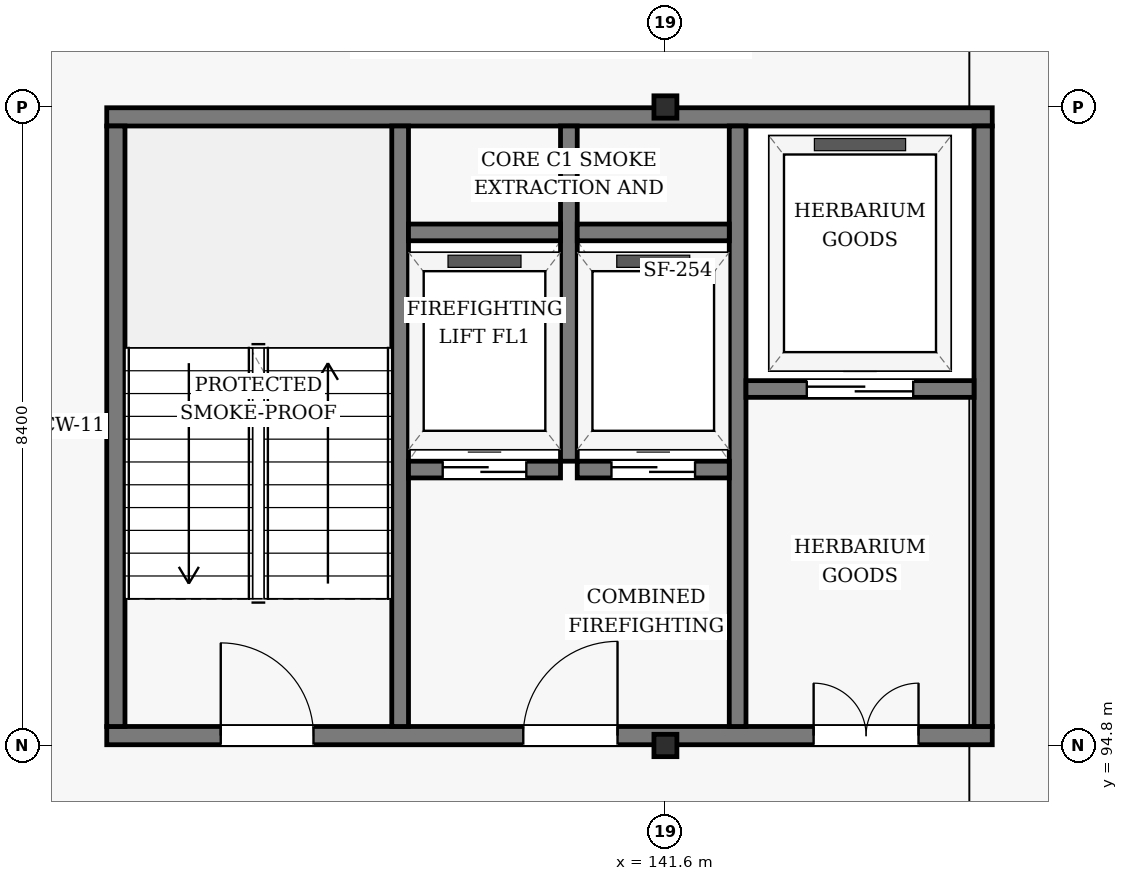
"""IFC4 building model, lengths in metres.
Left out: names, types, materials, properties, quantities, classifications, styles, units other than length and angle.
Written with IfcOpenShell. Run it as: python <this file> out.ifc"""

import sys

from ifc_helpers import new_model, si_unit, direction, frame, frame_2d, origin, origin_2d, place, context, subcontext, project, spatial, rectangle, i_section, extrude, element, fill, save


model = new_model("IFC4")
c1 = context("Model", 3, precision=1e-05, world=origin(), true_north=direction((0.0, 1.0)))
c2 = subcontext(c1, "Body", "Model", "MODEL_VIEW")
j1 = project(units=[si_unit("LENGTHUNIT", "METRE"), si_unit("PLANEANGLEUNIT", "RADIAN")], contexts=[c1])
p1 = place(None, origin())
s1 = spatial("IfcSite", under=j1, at=p1, CompositionType="ELEMENT")
p2 = place(p1, origin())
s2 = spatial("IfcBuilding", under=s1, at=p2, CompositionType="ELEMENT")
p3 = place(p2, frame((0.0, 0.0, 54.0)))
s3 = spatial("IfcBuildingStorey", under=s2, at=p3, CompositionType="ELEMENT", Elevation=54.0)
for number, where, z_axis, x_axis in (
    (1, (141.6, 94.8, 0.0), (0.0, 0.0, 1.0), (1.0, 0.0, 0.0)),
    (2, (141.6, 103.2, 0.0), (0.0, 0.0, 1.0), (1.0, 0.0, 0.0)),
):
    element("IfcColumn", number, at=place(p3, frame(where, z_axis=z_axis, x_axis=x_axis)), inside=s3, PredefinedType="COLUMN", context=c2, shape_type="SweptSolid", body=[
        extrude(i_section(OverallWidth=0.302, OverallDepth=0.294, WebThickness=0.012, FlangeThickness=0.012, FilletRadius=0.018, at=origin_2d()), origin(), (0.0, 0.0, 1.0), 3.6),
    ])
p4 = place(p3, frame((134.25, 94.93, 0.0), z_axis=(0.0, 0.0, 1.0), x_axis=(1.0, 0.0, 0.0)))
e3 = element("IfcWall", 3, at=p4, inside=s3, PredefinedType="SHEAR", context=c2, shape_type="SweptSolid", body=[
    extrude(rectangle(XDim=11.65, YDim=0.24, at=frame_2d((5.825, 0.0))), origin(), (0.0, 0.0, 1.0), 3.344),
])
p5 = place(p4, frame((1.5, 0.0, 0.0)))
e4 = element("IfcOpeningElement", 4, at=p5, cuts=e3, PredefinedType="OPENING", context=c2, shape_type="SweptSolid", body=[
    extrude(rectangle(XDim=1.22, YDim=2.18, at=frame_2d((0.61, 1.09))), frame((0.0, 0.13, 0.0), z_axis=(0.0, -1.0, 0.0), x_axis=(1.0, 0.0, 0.0)), (0.0, 0.0, 1.0), 0.26),
])
p6 = place(p4, frame((5.48, 0.0, 0.0)))
e5 = element("IfcOpeningElement", 5, at=p6, cuts=e3, PredefinedType="OPENING", context=c2, shape_type="SweptSolid", body=[
    extrude(rectangle(XDim=1.24, YDim=2.15, at=frame_2d((0.62, 1.075))), frame((0.0, 0.13, 0.0), z_axis=(0.0, -1.0, 0.0), x_axis=(1.0, 0.0, 0.0)), (0.0, 0.0, 1.0), 0.26),
])
p7 = place(p4, frame((9.3, 0.0, 0.0)))
e6 = element("IfcOpeningElement", 6, at=p7, cuts=e3, PredefinedType="OPENING", context=c2, shape_type="SweptSolid", body=[
    extrude(rectangle(XDim=1.38, YDim=2.15, at=frame_2d((0.69, 1.075))), frame((0.0, 0.13, 0.0), z_axis=(0.0, -1.0, 0.0), x_axis=(1.0, 0.0, 0.0)), (0.0, 0.0, 1.0), 0.26),
])
p8 = place(p3, frame((134.25, 103.07, 0.0), z_axis=(0.0, 0.0, 1.0), x_axis=(1.0, 0.0, 0.0)))
e7 = element("IfcWall", 7, at=p8, inside=s3, PredefinedType="SHEAR", context=c2, shape_type="SweptSolid", body=[
    extrude(rectangle(XDim=11.65, YDim=0.24, at=frame_2d((5.825, 0.0))), origin(), (0.0, 0.0, 1.0), 3.344),
])
p9 = place(p3, frame((134.37, 95.05, 0.0), z_axis=(0.0, 0.0, 1.0), x_axis=(0.0, 1.0, 0.0)))
e8 = element("IfcWall", 8, at=p9, inside=s3, PredefinedType="SHEAR", context=c2, shape_type="SweptSolid", body=[
    extrude(rectangle(XDim=7.9, YDim=0.24, at=frame_2d((3.95, 0.0))), origin(), (0.0, 0.0, 1.0), 3.344),
])
p10 = place(p3, frame((138.11, 95.05, 0.0), z_axis=(0.0, 0.0, 1.0), x_axis=(0.0, 1.0, 0.0)))
e9 = element("IfcWall", 9, at=p10, inside=s3, PredefinedType="SHEAR", context=c2, shape_type="SweptSolid", body=[
    extrude(rectangle(XDim=7.9, YDim=0.22, at=frame_2d((3.95, 0.0))), origin(), (0.0, 0.0, 1.0), 3.344),
])
p11 = place(p3, frame((140.33, 98.54, 0.0), z_axis=(0.0, 0.0, 1.0), x_axis=(0.0, 1.0, 0.0)))
e10 = element("IfcWall", 10, at=p11, inside=s3, PredefinedType="SHEAR", context=c2, shape_type="SweptSolid", body=[
    extrude(rectangle(XDim=4.41, YDim=0.22, at=frame_2d((2.205, 0.0))), origin(), (0.0, 0.0, 1.0), 3.344),
])
p12 = place(p3, frame((142.55, 95.05, 0.0), z_axis=(0.0, 0.0, 1.0), x_axis=(0.0, 1.0, 0.0)))
e11 = element("IfcWall", 11, at=p12, inside=s3, PredefinedType="SHEAR", context=c2, shape_type="SweptSolid", body=[
    extrude(rectangle(XDim=7.9, YDim=0.22, at=frame_2d((3.95, 0.0))), origin(), (0.0, 0.0, 1.0), 3.344),
])
p13 = place(p3, frame((145.78, 95.05, 0.0), z_axis=(0.0, 0.0, 1.0), x_axis=(0.0, 1.0, 0.0)))
e12 = element("IfcWall", 12, at=p13, inside=s3, PredefinedType="SHEAR", context=c2, shape_type="SweptSolid", body=[
    extrude(rectangle(XDim=7.9, YDim=0.24, at=frame_2d((3.95, 0.0))), origin(), (0.0, 0.0, 1.0), 3.344),
])
p14 = place(p3, frame((138.22, 98.43, 0.0), z_axis=(0.0, 0.0, 1.0), x_axis=(1.0, 0.0, 0.0)))
e13 = element("IfcWall", 13, at=p14, inside=s3, PredefinedType="SHEAR", context=c2, shape_type="SweptSolid", body=[
    extrude(rectangle(XDim=2.0, YDim=0.22, at=frame_2d((1.0, 0.0))), origin(), (0.0, 0.0, 1.0), 3.344),
])
p15 = place(p14, frame((0.45, 0.0, 0.0)))
e14 = element("IfcOpeningElement", 14, at=p15, cuts=e13, PredefinedType="OPENING", context=c2, shape_type="SweptSolid", body=[
    extrude(rectangle(XDim=1.1, YDim=2.15, at=frame_2d((0.55, 1.075))), frame((0.0, 0.12, 0.0), z_axis=(0.0, -1.0, 0.0), x_axis=(1.0, 0.0, 0.0)), (0.0, 0.0, 1.0), 0.24),
])
p16 = place(p3, frame((140.44, 98.43, 0.0), z_axis=(0.0, 0.0, 1.0), x_axis=(1.0, 0.0, 0.0)))
e15 = element("IfcWall", 15, at=p16, inside=s3, PredefinedType="SHEAR", context=c2, shape_type="SweptSolid", body=[
    extrude(rectangle(XDim=2.0, YDim=0.22, at=frame_2d((1.0, 0.0))), origin(), (0.0, 0.0, 1.0), 3.344),
])
p17 = place(p16, frame((0.45, 0.0, 0.0)))
e16 = element("IfcOpeningElement", 16, at=p17, cuts=e15, PredefinedType="OPENING", context=c2, shape_type="SweptSolid", body=[
    extrude(rectangle(XDim=1.1, YDim=2.15, at=frame_2d((0.55, 1.075))), frame((0.0, 0.12, 0.0), z_axis=(0.0, -1.0, 0.0), x_axis=(1.0, 0.0, 0.0)), (0.0, 0.0, 1.0), 0.24),
])
for number, where, z_axis, x_axis in (
    (17, (138.22, 101.55, 0.0), (0.0, 0.0, 1.0), (1.0, 0.0, 0.0)),
    (18, (140.44, 101.55, 0.0), (0.0, 0.0, 1.0), (1.0, 0.0, 0.0)),
):
    element("IfcWall", number, at=place(p3, frame(where, z_axis=z_axis, x_axis=x_axis)), inside=s3, PredefinedType="SHEAR", context=c2, shape_type="SweptSolid", body=[
        extrude(rectangle(XDim=2.0, YDim=0.22, at=frame_2d((1.0, 0.0))), origin(), (0.0, 0.0, 1.0), 3.344),
    ])
p18 = place(p3, frame((142.66, 99.49, 0.0), z_axis=(0.0, 0.0, 1.0), x_axis=(1.0, 0.0, 0.0)))
e19 = element("IfcWall", 19, at=p18, inside=s3, PredefinedType="SHEAR", context=c2, shape_type="SweptSolid", body=[
    extrude(rectangle(XDim=3.0, YDim=0.22, at=frame_2d((1.5, 0.0))), origin(), (0.0, 0.0, 1.0), 3.344),
])
p19 = place(p18, frame((0.8, 0.0, 0.0)))
e20 = element("IfcOpeningElement", 20, at=p19, cuts=e19, PredefinedType="OPENING", context=c2, shape_type="SweptSolid", body=[
    extrude(rectangle(XDim=1.4, YDim=2.2, at=frame_2d((0.7, 1.1))), frame((0.0, 0.12, 0.0), z_axis=(0.0, -1.0, 0.0), x_axis=(1.0, 0.0, 0.0)), (0.0, 0.0, 1.0), 0.24),
])
p20 = place(p5, origin())
e21 = element("IfcDoor", 21, at=p20, inside=s3, OperationType="SINGLE_SWING_LEFT", PredefinedType="DOOR", context=c2, shape_type="SweptSolid", body=[
    extrude(rectangle(XDim=1.22, YDim=2.18, at=frame_2d((0.61, 1.09))), frame((0.0, 0.025, 0.0), z_axis=(0.0, -1.0, 0.0), x_axis=(1.0, 0.0, 0.0)), (0.0, 0.0, 1.0), 0.05),
])
fill(e4, e21)
p21 = place(p6, frame((1.24, 0.0, 0.0), z_axis=(0.0, 0.0, 1.0), x_axis=(-1.0, 0.0, 0.0)))
e22 = element("IfcDoor", 22, at=p21, inside=s3, OperationType="SINGLE_SWING_RIGHT", PredefinedType="DOOR", context=c2, shape_type="SweptSolid", body=[
    extrude(rectangle(XDim=1.24, YDim=2.15, at=frame_2d((0.62, 1.075))), frame((0.0, 0.025, 0.0), z_axis=(0.0, -1.0, 0.0), x_axis=(1.0, 0.0, 0.0)), (0.0, 0.0, 1.0), 0.05),
])
fill(e5, e22)
p22 = place(p7, frame((1.38, 0.0, 0.0), z_axis=(0.0, 0.0, 1.0), x_axis=(-1.0, 0.0, 0.0)))
e23 = element("IfcDoor", 23, at=p22, inside=s3, OperationType="DOUBLE_DOOR_SINGLE_SWING", PredefinedType="DOOR", context=c2, shape_type="SweptSolid", body=[
    extrude(rectangle(XDim=1.38, YDim=2.15, at=frame_2d((0.69, 1.075))), frame((0.0, 0.025, 0.0), z_axis=(0.0, -1.0, 0.0), x_axis=(1.0, 0.0, 0.0)), (0.0, 0.0, 1.0), 0.05),
])
fill(e6, e23)
p23 = place(p15, origin())
e24 = element("IfcDoor", 24, at=p23, inside=s3, OperationType="SLIDING_TO_LEFT", PredefinedType="DOOR", context=c2, shape_type="SweptSolid", body=[
    extrude(rectangle(XDim=1.1, YDim=2.15, at=frame_2d((0.55, 1.075))), frame((0.0, 0.025, 0.0), z_axis=(0.0, -1.0, 0.0), x_axis=(1.0, 0.0, 0.0)), (0.0, 0.0, 1.0), 0.05),
])
fill(e14, e24)
p24 = place(p17, origin())
e25 = element("IfcDoor", 25, at=p24, inside=s3, OperationType="SLIDING_TO_LEFT", PredefinedType="DOOR", context=c2, shape_type="SweptSolid", body=[
    extrude(rectangle(XDim=1.1, YDim=2.15, at=frame_2d((0.55, 1.075))), frame((0.0, 0.025, 0.0), z_axis=(0.0, -1.0, 0.0), x_axis=(1.0, 0.0, 0.0)), (0.0, 0.0, 1.0), 0.05),
])
fill(e16, e25)
p25 = place(p19, origin())
e26 = element("IfcDoor", 26, at=p25, inside=s3, OperationType="SLIDING_TO_LEFT", PredefinedType="DOOR", context=c2, shape_type="SweptSolid", body=[
    extrude(rectangle(XDim=1.4, YDim=2.2, at=frame_2d((0.7, 1.1))), frame((0.0, 0.025, 0.0), z_axis=(0.0, -1.0, 0.0), x_axis=(1.0, 0.0, 0.0)), (0.0, 0.0, 1.0), 0.05),
])
fill(e20, e26)
save(model, sys.argv[1])
